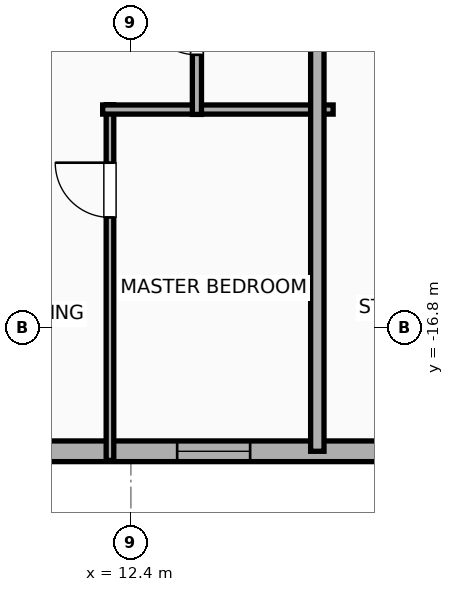
"""IFC4 building model, lengths in metres.
Left out: names, types, materials, properties, quantities, classifications, styles, units other than length and angle.
Written with IfcOpenShell. Run it as: python <this file> out.ifc"""

import sys

from ifc_helpers import new_model, si_unit, direction, frame, frame_2d, origin, place, context, subcontext, project, spatial, rectangle, extrude, element, fill, save


model = new_model("IFC4")
c1 = context("Model", 3, precision=1e-05, world=origin(), true_north=direction((0.0, 1.0)))
c2 = subcontext(c1, "Body", "Model", "MODEL_VIEW")
j1 = project(units=[si_unit("LENGTHUNIT", "METRE"), si_unit("PLANEANGLEUNIT", "RADIAN")], contexts=[c1])
p1 = place(None, origin())
s1 = spatial("IfcSite", under=j1, at=p1, CompositionType="ELEMENT")
p2 = place(p1, origin())
s2 = spatial("IfcBuilding", under=s1, at=p2, CompositionType="ELEMENT")
p3 = place(p2, frame((0.0, 0.0, 250.9)))
s3 = spatial("IfcBuildingStorey", under=s2, at=p3, CompositionType="ELEMENT", Elevation=250.9)
p4 = place(p3, frame((26.783, -18.83, 0.0), z_axis=(0.0, 0.0, 1.0), x_axis=(-1.0, 0.0, 0.0)))
e1 = element("IfcWall", 1, at=p4, inside=s3, PredefinedType="ELEMENTEDWALL", context=c2, shape_type="SweptSolid", body=[
    extrude(rectangle(XDim=49.566, YDim=0.34, at=frame_2d((24.783, 0.0))), origin(), (0.0, 0.0, 1.0), 2.39),
])
p5 = place(p4, frame((23.583, 0.0, 0.75)))
e2 = element("IfcOpeningElement", 2, at=p5, cuts=e1, PredefinedType="OPENING", context=c2, shape_type="SweptSolid", body=[
    extrude(rectangle(XDim=2.4, YDim=1.45, at=frame_2d((1.2, 0.725))), frame((0.0, 0.18, 0.0), z_axis=(0.0, -1.0, 0.0), x_axis=(1.0, 0.0, 0.0)), (0.0, 0.0, 1.0), 0.36),
])
p6 = place(p4, frame((41.756, 0.0, 0.75)))
e3 = element("IfcOpeningElement", 3, at=p6, cuts=e1, PredefinedType="OPENING", context=c2, shape_type="SweptSolid", body=[
    extrude(rectangle(XDim=2.4, YDim=1.45, at=frame_2d((1.2, 0.725))), frame((0.0, 0.18, 0.0), z_axis=(0.0, -1.0, 0.0), x_axis=(1.0, 0.0, 0.0)), (0.0, 0.0, 1.0), 0.36),
])
p7 = place(p4, frame((47.222, 0.0, 0.55)))
e4 = element("IfcOpeningElement", 4, at=p7, cuts=e1, PredefinedType="OPENING", context=c2, shape_type="SweptSolid", body=[
    extrude(rectangle(XDim=1.2, YDim=1.15, at=frame_2d((0.6, 0.575))), frame((0.0, 0.18, 0.0), z_axis=(0.0, -1.0, 0.0), x_axis=(1.0, 0.0, 0.0)), (0.0, 0.0, 1.0), 0.36),
])
p8 = place(p4, frame((45.181, 0.0, 0.55)))
e5 = element("IfcOpeningElement", 5, at=p8, cuts=e1, PredefinedType="OPENING", context=c2, shape_type="SweptSolid", body=[
    extrude(rectangle(XDim=1.2, YDim=1.15, at=frame_2d((0.6, 0.575))), frame((0.0, 0.18, 0.0), z_axis=(0.0, -1.0, 0.0), x_axis=(1.0, 0.0, 0.0)), (0.0, 0.0, 1.0), 0.36),
])
p9 = place(p4, frame((37.289, 0.0, 0.55)))
e6 = element("IfcOpeningElement", 6, at=p9, cuts=e1, PredefinedType="OPENING", context=c2, shape_type="SweptSolid", body=[
    extrude(rectangle(XDim=1.2, YDim=1.15, at=frame_2d((0.6, 0.575))), frame((0.0, 0.18, 0.0), z_axis=(0.0, -1.0, 0.0), x_axis=(1.0, 0.0, 0.0)), (0.0, 0.0, 1.0), 0.36),
])
p10 = place(p4, frame((16.115, 0.0, 0.55)))
e7 = element("IfcOpeningElement", 7, at=p10, cuts=e1, PredefinedType="OPENING", context=c2, shape_type="SweptSolid", body=[
    extrude(rectangle(XDim=1.2, YDim=1.15, at=frame_2d((0.6, 0.575))), frame((0.0, 0.18, 0.0), z_axis=(0.0, -1.0, 0.0), x_axis=(1.0, 0.0, 0.0)), (0.0, 0.0, 1.0), 0.36),
])
p11 = place(p4, frame((12.422, 0.0, 0.55)))
e8 = element("IfcOpeningElement", 8, at=p11, cuts=e1, PredefinedType="OPENING", context=c2, shape_type="SweptSolid", body=[
    extrude(rectangle(XDim=1.2, YDim=1.15, at=frame_2d((0.6, 0.575))), frame((0.0, 0.18, 0.0), z_axis=(0.0, -1.0, 0.0), x_axis=(1.0, 0.0, 0.0)), (0.0, 0.0, 1.0), 0.36),
])
p12 = place(p4, frame((6.705, 0.0, 0.55)))
e9 = element("IfcOpeningElement", 9, at=p12, cuts=e1, PredefinedType="OPENING", context=c2, shape_type="SweptSolid", body=[
    extrude(rectangle(XDim=0.85, YDim=1.15, at=frame_2d((0.425, 0.575))), frame((0.0, 0.18, 0.0), z_axis=(0.0, -1.0, 0.0), x_axis=(1.0, 0.0, 0.0)), (0.0, 0.0, 1.0), 0.36),
])
p13 = place(p4, frame((4.637, 0.0, 0.55)))
e10 = element("IfcOpeningElement", 10, at=p13, cuts=e1, PredefinedType="OPENING", context=c2, shape_type="SweptSolid", body=[
    extrude(rectangle(XDim=1.2, YDim=1.15, at=frame_2d((0.6, 0.575))), frame((0.0, 0.18, 0.0), z_axis=(0.0, -1.0, 0.0), x_axis=(1.0, 0.0, 0.0)), (0.0, 0.0, 1.0), 0.36),
])
p14 = place(p4, frame((1.811, 0.0, 0.55)))
e11 = element("IfcOpeningElement", 11, at=p14, cuts=e1, PredefinedType="OPENING", context=c2, shape_type="SweptSolid", body=[
    extrude(rectangle(XDim=1.2, YDim=1.15, at=frame_2d((0.6, 0.575))), frame((0.0, 0.18, 0.0), z_axis=(0.0, -1.0, 0.0), x_axis=(1.0, 0.0, 0.0)), (0.0, 0.0, 1.0), 0.36),
])
p15 = place(p4, frame((32.253, 0.0, 0.55)))
e12 = element("IfcOpeningElement", 12, at=p15, cuts=e1, PredefinedType="OPENING", context=c2, shape_type="SweptSolid", body=[
    extrude(rectangle(XDim=1.2, YDim=1.15, at=frame_2d((0.6, 0.575))), frame((0.0, 0.18, 0.0), z_axis=(0.0, -1.0, 0.0), x_axis=(1.0, 0.0, 0.0)), (0.0, 0.0, 1.0), 0.36),
])
p16 = place(p4, frame((27.853, 0.0, 0.55)))
e13 = element("IfcOpeningElement", 13, at=p16, cuts=e1, PredefinedType="OPENING", context=c2, shape_type="SweptSolid", body=[
    extrude(rectangle(XDim=1.2, YDim=1.15, at=frame_2d((0.6, 0.575))), frame((0.0, 0.18, 0.0), z_axis=(0.0, -1.0, 0.0), x_axis=(1.0, 0.0, 0.0)), (0.0, 0.0, 1.0), 0.36),
])
p17 = place(p4, frame((20.473, 0.0, 0.55)))
e14 = element("IfcOpeningElement", 14, at=p17, cuts=e1, PredefinedType="OPENING", context=c2, shape_type="SweptSolid", body=[
    extrude(rectangle(XDim=1.2, YDim=1.15, at=frame_2d((0.6, 0.575))), frame((0.0, 0.18, 0.0), z_axis=(0.0, -1.0, 0.0), x_axis=(1.0, 0.0, 0.0)), (0.0, 0.0, 1.0), 0.36),
])
p18 = place(p3, frame((12.056, -18.98, 0.0), z_axis=(0.0, 0.0, 1.0), x_axis=(0.0, 1.0, 0.0)))
e15 = element("IfcWall", 15, at=p18, inside=s3, PredefinedType="PARTITIONING", context=c2, shape_type="SweptSolid", body=[
    extrude(rectangle(XDim=5.85, YDim=0.125, at=frame_2d((2.925, 0.0))), origin(), (0.0, 0.0, 1.0), 3.5),
])
p19 = place(p18, frame((3.996, 0.0, 0.0)))
e16 = element("IfcOpeningElement", 16, at=p19, cuts=e15, PredefinedType="OPENING", context=c2, shape_type="SweptSolid", body=[
    extrude(rectangle(XDim=0.9, YDim=2.05, at=frame_2d((0.45, 1.025))), frame((0.0, 0.073, 0.0), z_axis=(0.0, -1.0, 0.0), x_axis=(1.0, 0.0, 0.0)), (0.0, 0.0, 1.0), 0.145),
])
p20 = place(p3, frame((11.936, -13.21, 0.0), z_axis=(0.0, 0.0, 1.0), x_axis=(1.0, 0.0, 0.0)))
e17 = element("IfcWall", 17, at=p20, inside=s3, PredefinedType="PLUMBINGWALL", context=c2, shape_type="SweptSolid", body=[
    extrude(rectangle(XDim=3.79, YDim=0.15, at=frame_2d((1.895, 0.0))), origin(), (0.0, 0.0, 1.0), 3.5),
])
p21 = place(p3, frame((13.486, -13.29, 0.0), z_axis=(0.0, 0.0, 1.0), x_axis=(0.0, 1.0, 0.0)))
e18 = element("IfcWall", 18, at=p21, inside=s3, PredefinedType="PLUMBINGWALL", context=c2, shape_type="SweptSolid", body=[
    extrude(rectangle(XDim=2.86, YDim=0.15, at=frame_2d((1.43, 0.0))), origin(), (0.0, 0.0, 1.0), 3.5),
])
p22 = place(p21, frame((0.98, 0.0, 0.0)))
e19 = element("IfcOpeningElement", 19, at=p22, cuts=e18, PredefinedType="OPENING", context=c2, shape_type="SweptSolid", body=[
    extrude(rectangle(XDim=0.9, YDim=2.05, at=frame_2d((0.45, 1.025))), frame((0.0, 0.085, 0.0), z_axis=(0.0, -1.0, 0.0), x_axis=(1.0, 0.0, 0.0)), (0.0, 0.0, 1.0), 0.17),
])
p23 = place(p3, frame((15.466, -18.83, 0.0), z_axis=(0.0, 0.0, 1.0), x_axis=(0.0, 1.0, 0.0)))
e20 = element("IfcWall", 20, at=p23, inside=s3, PredefinedType="PARTITIONING", context=c2, shape_type="SweptSolid", body=[
    extrude(rectangle(XDim=8.46, YDim=0.22, at=frame_2d((4.23, 0.0))), origin(), (0.0, 0.0, 1.0), 2.39),
])
p24 = place(p11, origin())
e21 = element("IfcWindow", 21, at=p24, inside=s3, PartitioningType="SINGLE_PANEL", PredefinedType="WINDOW", context=c2, shape_type="SweptSolid", body=[
    extrude(rectangle(XDim=1.2, YDim=1.15, at=frame_2d((0.6, 0.575))), frame((0.0, 0.03, 0.0), z_axis=(0.0, -1.0, 0.0), x_axis=(1.0, 0.0, 0.0)), (0.0, 0.0, 1.0), 0.06),
])
fill(e8, e21)
p25 = place(p19, origin())
e22 = element("IfcDoor", 22, at=p25, inside=s3, OperationType="SINGLE_SWING_RIGHT", PredefinedType="DOOR", context=c2, shape_type="SweptSolid", body=[
    extrude(rectangle(XDim=0.9, YDim=2.05, at=frame_2d((0.45, 1.025))), frame((0.0, 0.025, 0.0), z_axis=(0.0, -1.0, 0.0), x_axis=(1.0, 0.0, 0.0)), (0.0, 0.0, 1.0), 0.05),
])
fill(e16, e22)
p26 = place(p22, origin())
e23 = element("IfcDoor", 23, at=p26, inside=s3, OperationType="SINGLE_SWING_RIGHT", PredefinedType="DOOR", context=c2, shape_type="SweptSolid", body=[
    extrude(rectangle(XDim=0.9, YDim=2.05, at=frame_2d((0.45, 1.025))), frame((0.0, 0.025, 0.0), z_axis=(0.0, -1.0, 0.0), x_axis=(1.0, 0.0, 0.0)), (0.0, 0.0, 1.0), 0.05),
])
fill(e19, e23)
save(model, sys.argv[1])
